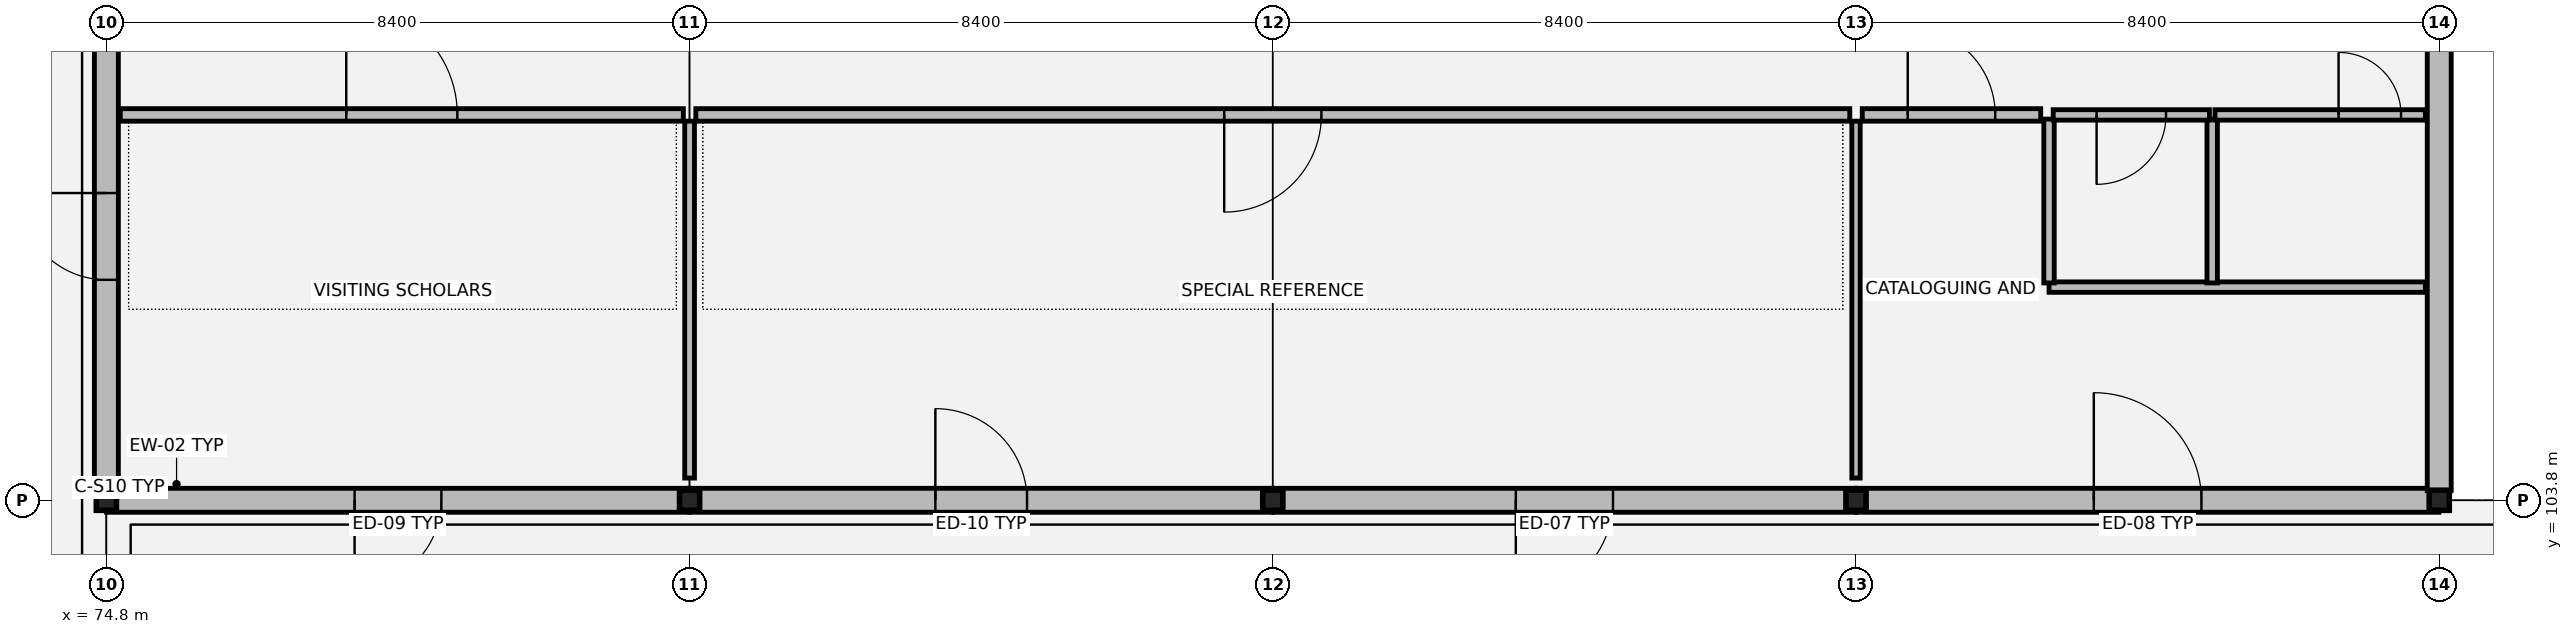
"""IFC4 building model, lengths in metres.
Left out: names, types, materials, properties, quantities, classifications, styles, units other than length and angle.
Written with IfcOpenShell. Run it as: python <this file> out.ifc"""

import sys

from ifc_helpers import new_model, si_unit, direction, frame, frame_2d, origin, origin_2d, place, context, subcontext, project, spatial, rectangle, i_section, extrude, element, fill, save


model = new_model("IFC4")
c1 = context("Model", 3, precision=1e-05, world=origin(), true_north=direction((0.0, 1.0)))
c2 = subcontext(c1, "Body", "Model", "MODEL_VIEW")
j1 = project(units=[si_unit("LENGTHUNIT", "METRE"), si_unit("PLANEANGLEUNIT", "RADIAN")], contexts=[c1])
p1 = place(None, origin())
s1 = spatial("IfcSite", under=j1, at=p1, CompositionType="ELEMENT")
p2 = place(p1, origin())
s2 = spatial("IfcBuilding", under=s1, at=p2, CompositionType="ELEMENT")
p3 = place(p2, frame((0.0, 0.0, 21.42)))
s3 = spatial("IfcBuildingStorey", under=s2, at=p3, CompositionType="ELEMENT", Elevation=21.42)
for number, where, z_axis, x_axis in (
    (1, (74.8, 103.8, 0.0), (0.0, 0.0, 1.0), (1.0, 0.0, 0.0)),
    (2, (83.2, 103.8, 0.0), (0.0, 0.0, 1.0), (1.0, 0.0, 0.0)),
    (3, (91.6, 103.8, 0.0), (0.0, 0.0, 1.0), (1.0, 0.0, 0.0)),
    (4, (100.0, 103.8, 0.0), (0.0, 0.0, 1.0), (1.0, 0.0, 0.0)),
    (5, (108.4, 103.8, 0.0), (0.0, 0.0, 1.0), (1.0, 0.0, 0.0)),
):
    element("IfcColumn", number, at=place(p3, frame(where, z_axis=z_axis, x_axis=x_axis)), inside=s3, PredefinedType="COLUMN", context=c2, shape_type="SweptSolid", body=[
        extrude(i_section(OverallWidth=0.28, OverallDepth=0.28, WebThickness=0.01, FlangeThickness=0.018, at=origin_2d()), origin(), (0.0, 0.0, 1.0), 3.88),
    ])
p4 = place(p3, frame((74.804, 103.8, 0.0), z_axis=(0.0, 0.0, 1.0), x_axis=(1.0, 0.0, 0.0)))
e6 = element("IfcWall", 6, at=p4, inside=s3, PredefinedType="SOLIDWALL", context=c2, shape_type="SweptSolid", body=[
    extrude(rectangle(XDim=8.392, YDim=0.345, at=frame_2d((4.196, 0.0))), origin(), (0.0, 0.0, 1.0), 3.32),
])
p5 = place(p4, frame((3.571, 0.0, 0.0)))
e7 = element("IfcOpeningElement", 7, at=p5, cuts=e6, PredefinedType="OPENING", context=c2, shape_type="SweptSolid", body=[
    extrude(rectangle(XDim=1.25, YDim=2.2, at=frame_2d((0.625, 1.1))), frame((0.0, 0.182, 0.0), z_axis=(0.0, -1.0, 0.0), x_axis=(1.0, 0.0, 0.0)), (0.0, 0.0, 1.0), 0.365),
])
p6 = place(p3, frame((83.204, 103.8, 0.0), z_axis=(0.0, 0.0, 1.0), x_axis=(1.0, 0.0, 0.0)))
e8 = element("IfcWall", 8, at=p6, inside=s3, PredefinedType="SOLIDWALL", context=c2, shape_type="SweptSolid", body=[
    extrude(rectangle(XDim=8.392, YDim=0.345, at=frame_2d((4.196, 0.0))), origin(), (0.0, 0.0, 1.0), 3.32),
])
p7 = place(p6, frame((3.536, 0.0, 0.0)))
e9 = element("IfcOpeningElement", 9, at=p7, cuts=e8, PredefinedType="OPENING", context=c2, shape_type="SweptSolid", body=[
    extrude(rectangle(XDim=1.32, YDim=2.22, at=frame_2d((0.66, 1.11))), frame((0.0, 0.182, 0.0), z_axis=(0.0, -1.0, 0.0), x_axis=(1.0, 0.0, 0.0)), (0.0, 0.0, 1.0), 0.365),
])
p8 = place(p3, frame((91.604, 103.8, 0.0), z_axis=(0.0, 0.0, 1.0), x_axis=(1.0, 0.0, 0.0)))
e10 = element("IfcWall", 10, at=p8, inside=s3, PredefinedType="SOLIDWALL", context=c2, shape_type="SweptSolid", body=[
    extrude(rectangle(XDim=8.392, YDim=0.345, at=frame_2d((4.196, 0.0))), origin(), (0.0, 0.0, 1.0), 3.32),
])
p9 = place(p8, frame((3.496, 0.0, 0.0)))
e11 = element("IfcOpeningElement", 11, at=p9, cuts=e10, PredefinedType="OPENING", context=c2, shape_type="SweptSolid", body=[
    extrude(rectangle(XDim=1.4, YDim=2.25, at=frame_2d((0.7, 1.125))), frame((0.0, 0.182, 0.0), z_axis=(0.0, -1.0, 0.0), x_axis=(1.0, 0.0, 0.0)), (0.0, 0.0, 1.0), 0.365),
])
p10 = place(p3, frame((100.004, 103.8, 0.0), z_axis=(0.0, 0.0, 1.0), x_axis=(1.0, 0.0, 0.0)))
e12 = element("IfcWall", 12, at=p10, inside=s3, PredefinedType="SOLIDWALL", context=c2, shape_type="SweptSolid", body=[
    extrude(rectangle(XDim=8.392, YDim=0.345, at=frame_2d((4.196, 0.0))), origin(), (0.0, 0.0, 1.0), 3.32),
])
p11 = place(p10, frame((3.421, 0.0, 0.0)))
e13 = element("IfcOpeningElement", 13, at=p11, cuts=e12, PredefinedType="OPENING", context=c2, shape_type="SweptSolid", body=[
    extrude(rectangle(XDim=1.55, YDim=2.28, at=frame_2d((0.775, 1.14))), frame((0.0, 0.182, 0.0), z_axis=(0.0, -1.0, 0.0), x_axis=(1.0, 0.0, 0.0)), (0.0, 0.0, 1.0), 0.365),
])
p12 = place(p3, frame((108.4, 103.938, 0.0), z_axis=(0.0, 0.0, 1.0), x_axis=(0.0, 1.0, 0.0)))
e14 = element("IfcWall", 14, at=p12, inside=s3, PredefinedType="SOLIDWALL", context=c2, shape_type="SweptSolid", body=[
    extrude(rectangle(XDim=7.324, YDim=0.345, at=frame_2d((3.662, 0.0))), origin(), (0.0, 0.0, 1.0), 3.22),
])
p13 = place(p3, frame((74.8, 111.262, 0.0), z_axis=(0.0, 0.0, 1.0), x_axis=(0.0, -1.0, 0.0)))
e15 = element("IfcWall", 15, at=p13, inside=s3, PredefinedType="SOLIDWALL", context=c2, shape_type="SweptSolid", body=[
    extrude(rectangle(XDim=7.324, YDim=0.345, at=frame_2d((3.662, 0.0))), origin(), (0.0, 0.0, 1.0), 3.22),
])
p14 = place(p13, frame((3.037, 0.0, 0.0)))
e16 = element("IfcOpeningElement", 16, at=p14, cuts=e15, PredefinedType="OPENING", context=c2, shape_type="SweptSolid", body=[
    extrude(rectangle(XDim=1.25, YDim=2.2, at=frame_2d((0.625, 1.1))), frame((0.0, 0.182, 0.0), z_axis=(0.0, -1.0, 0.0), x_axis=(1.0, 0.0, 0.0)), (0.0, 0.0, 1.0), 0.365),
])
p15 = place(p3, frame((102.78, 106.87, 0.0), z_axis=(0.0, 0.0, 1.0), x_axis=(1.0, 0.0, 0.0)))
e17 = element("IfcWall", 17, at=p15, inside=s3, PredefinedType="PARTITIONING", context=c2, shape_type="SweptSolid", body=[
    extrude(rectangle(XDim=5.42, YDim=0.15, at=frame_2d((2.71, 0.0))), origin(), (0.0, 0.0, 1.0), 3.18),
])
for number, where, z_axis, x_axis in (
    (18, (102.78, 106.93, 0.0), (0.0, 0.0, 1.0), (0.0, 1.0, 0.0)),
    (19, (105.13, 106.93, 0.0), (0.0, 0.0, 1.0), (0.0, 1.0, 0.0)),
):
    element("IfcWall", number, at=place(p3, frame(where, z_axis=z_axis, x_axis=x_axis)), inside=s3, PredefinedType="PARTITIONING", context=c2, shape_type="SweptSolid", body=[
        extrude(rectangle(XDim=2.36, YDim=0.15, at=frame_2d((1.18, 0.0))), origin(), (0.0, 0.0, 1.0), 3.18),
    ])
p16 = place(p3, frame((102.84, 109.35, 0.0), z_axis=(0.0, 0.0, 1.0), x_axis=(1.0, 0.0, 0.0)))
e20 = element("IfcWall", 20, at=p16, inside=s3, PredefinedType="PARTITIONING", context=c2, shape_type="SweptSolid", body=[
    extrude(rectangle(XDim=2.25, YDim=0.15, at=frame_2d((1.125, 0.0))), origin(), (0.0, 0.0, 1.0), 3.18),
])
p17 = place(p16, frame((0.625, 0.0, 0.0)))
e21 = element("IfcOpeningElement", 21, at=p17, cuts=e20, PredefinedType="OPENING", context=c2, shape_type="SweptSolid", body=[
    extrude(rectangle(XDim=1.0, YDim=2.15, at=frame_2d((0.5, 1.075))), frame((0.0, 0.085, 0.0), z_axis=(0.0, -1.0, 0.0), x_axis=(1.0, 0.0, 0.0)), (0.0, 0.0, 1.0), 0.17),
])
p18 = place(p3, frame((105.17, 109.35, 0.0), z_axis=(0.0, 0.0, 1.0), x_axis=(1.0, 0.0, 0.0)))
e22 = element("IfcWall", 22, at=p18, inside=s3, PredefinedType="PARTITIONING", context=c2, shape_type="SweptSolid", body=[
    extrude(rectangle(XDim=3.03, YDim=0.15, at=frame_2d((1.515, 0.0))), origin(), (0.0, 0.0, 1.0), 3.18),
])
p19 = place(p18, frame((1.78, 0.0, 0.0)))
e23 = element("IfcOpeningElement", 23, at=p19, cuts=e22, PredefinedType="OPENING", context=c2, shape_type="SweptSolid", body=[
    extrude(rectangle(XDim=0.9, YDim=2.15, at=frame_2d((0.45, 1.075))), frame((0.0, 0.085, 0.0), z_axis=(0.0, -1.0, 0.0), x_axis=(1.0, 0.0, 0.0)), (0.0, 0.0, 1.0), 0.17),
])
p20 = place(p3, frame((75.0, 109.35, 0.0), z_axis=(0.0, 0.0, 1.0), x_axis=(1.0, 0.0, 0.0)))
e24 = element("IfcWall", 24, at=p20, inside=s3, PredefinedType="PARTITIONING", context=c2, shape_type="SweptSolid", body=[
    extrude(rectangle(XDim=8.11, YDim=0.18, at=frame_2d((4.055, 0.0))), origin(), (0.0, 0.0, 1.0), 3.18),
])
p21 = place(p20, frame((3.255, 0.0, 0.0)))
e25 = element("IfcOpeningElement", 25, at=p21, cuts=e24, PredefinedType="OPENING", context=c2, shape_type="SweptSolid", body=[
    extrude(rectangle(XDim=1.6, YDim=2.25, at=frame_2d((0.8, 1.125))), frame((0.0, 0.1, 0.0), z_axis=(0.0, -1.0, 0.0), x_axis=(1.0, 0.0, 0.0)), (0.0, 0.0, 1.0), 0.2),
])
p22 = place(p3, frame((83.29, 109.35, 0.0), z_axis=(0.0, 0.0, 1.0), x_axis=(1.0, 0.0, 0.0)))
e26 = element("IfcWall", 26, at=p22, inside=s3, PredefinedType="PARTITIONING", context=c2, shape_type="SweptSolid", body=[
    extrude(rectangle(XDim=16.62, YDim=0.18, at=frame_2d((8.31, 0.0))), origin(), (0.0, 0.0, 1.0), 3.18),
])
p23 = place(p22, frame((7.61, 0.0, 0.0)))
e27 = element("IfcOpeningElement", 27, at=p23, cuts=e26, PredefinedType="OPENING", context=c2, shape_type="SweptSolid", body=[
    extrude(rectangle(XDim=1.4, YDim=2.22, at=frame_2d((0.7, 1.11))), frame((0.0, 0.1, 0.0), z_axis=(0.0, -1.0, 0.0), x_axis=(1.0, 0.0, 0.0)), (0.0, 0.0, 1.0), 0.2),
])
p24 = place(p3, frame((100.09, 109.35, 0.0), z_axis=(0.0, 0.0, 1.0), x_axis=(1.0, 0.0, 0.0)))
e28 = element("IfcWall", 28, at=p24, inside=s3, PredefinedType="PARTITIONING", context=c2, shape_type="SweptSolid", body=[
    extrude(rectangle(XDim=2.57, YDim=0.18, at=frame_2d((1.285, 0.0))), origin(), (0.0, 0.0, 1.0), 3.18),
])
p25 = place(p24, frame((0.655, 0.0, 0.0)))
e29 = element("IfcOpeningElement", 29, at=p25, cuts=e28, PredefinedType="OPENING", context=c2, shape_type="SweptSolid", body=[
    extrude(rectangle(XDim=1.26, YDim=2.2, at=frame_2d((0.63, 1.1))), frame((0.0, 0.1, 0.0), z_axis=(0.0, -1.0, 0.0), x_axis=(1.0, 0.0, 0.0)), (0.0, 0.0, 1.0), 0.2),
])
p26 = place(p3, frame((83.2, 104.12, 0.0), z_axis=(0.0, 0.0, 1.0), x_axis=(0.0, 1.0, 0.0)))
e30 = element("IfcWall", 30, at=p26, inside=s3, PredefinedType="PARTITIONING", context=c2, shape_type="SweptSolid", body=[
    extrude(rectangle(XDim=5.14, YDim=0.14, at=frame_2d((2.57, 0.0))), origin(), (0.0, 0.0, 1.0), 3.18),
])
p27 = place(p3, frame((100.0, 104.12, 0.0), z_axis=(0.0, 0.0, 1.0), x_axis=(0.0, 1.0, 0.0)))
e31 = element("IfcWall", 31, at=p27, inside=s3, PredefinedType="PARTITIONING", context=c2, shape_type="SweptSolid", body=[
    extrude(rectangle(XDim=5.14, YDim=0.12, at=frame_2d((2.57, 0.0))), origin(), (0.0, 0.0, 1.0), 3.18),
])
p28 = place(p5, origin())
e32 = element("IfcDoor", 32, at=p28, inside=s3, OperationType="SINGLE_SWING_RIGHT", PredefinedType="DOOR", context=c2, shape_type="SweptSolid", body=[
    extrude(rectangle(XDim=1.25, YDim=2.2, at=frame_2d((0.625, 1.1))), frame((0.0, 0.025, 0.0), z_axis=(0.0, -1.0, 0.0), x_axis=(1.0, 0.0, 0.0)), (0.0, 0.0, 1.0), 0.05),
])
fill(e7, e32)
p29 = place(p7, origin())
e33 = element("IfcDoor", 33, at=p29, inside=s3, OperationType="SINGLE_SWING_LEFT", PredefinedType="DOOR", context=c2, shape_type="SweptSolid", body=[
    extrude(rectangle(XDim=1.32, YDim=2.22, at=frame_2d((0.66, 1.11))), frame((0.0, 0.025, 0.0), z_axis=(0.0, -1.0, 0.0), x_axis=(1.0, 0.0, 0.0)), (0.0, 0.0, 1.0), 0.05),
])
fill(e9, e33)
p30 = place(p9, origin())
e34 = element("IfcDoor", 34, at=p30, inside=s3, OperationType="SINGLE_SWING_RIGHT", PredefinedType="DOOR", context=c2, shape_type="SweptSolid", body=[
    extrude(rectangle(XDim=1.4, YDim=2.25, at=frame_2d((0.7, 1.125))), frame((0.0, 0.025, 0.0), z_axis=(0.0, -1.0, 0.0), x_axis=(1.0, 0.0, 0.0)), (0.0, 0.0, 1.0), 0.05),
])
fill(e11, e34)
p31 = place(p11, origin())
e35 = element("IfcDoor", 35, at=p31, inside=s3, OperationType="SINGLE_SWING_LEFT", PredefinedType="DOOR", context=c2, shape_type="SweptSolid", body=[
    extrude(rectangle(XDim=1.55, YDim=2.28, at=frame_2d((0.775, 1.14))), frame((0.0, 0.025, 0.0), z_axis=(0.0, -1.0, 0.0), x_axis=(1.0, 0.0, 0.0)), (0.0, 0.0, 1.0), 0.05),
])
fill(e13, e35)
p32 = place(p14, origin())
e36 = element("IfcDoor", 36, at=p32, inside=s3, OperationType="SINGLE_SWING_RIGHT", PredefinedType="DOOR", context=c2, shape_type="SweptSolid", body=[
    extrude(rectangle(XDim=1.25, YDim=2.2, at=frame_2d((0.625, 1.1))), frame((0.0, 0.025, 0.0), z_axis=(0.0, -1.0, 0.0), x_axis=(1.0, 0.0, 0.0)), (0.0, 0.0, 1.0), 0.05),
])
fill(e16, e36)
p33 = place(p17, origin())
e37 = element("IfcDoor", 37, at=p33, inside=s3, OperationType="SINGLE_SWING_RIGHT", PredefinedType="DOOR", context=c2, shape_type="SweptSolid", body=[
    extrude(rectangle(XDim=1.0, YDim=2.15, at=frame_2d((0.5, 1.075))), frame((0.0, 0.025, 0.0), z_axis=(0.0, -1.0, 0.0), x_axis=(1.0, 0.0, 0.0)), (0.0, 0.0, 1.0), 0.05),
])
fill(e21, e37)
p34 = place(p19, origin())
e38 = element("IfcDoor", 38, at=p34, inside=s3, OperationType="SINGLE_SWING_LEFT", PredefinedType="DOOR", context=c2, shape_type="SweptSolid", body=[
    extrude(rectangle(XDim=0.9, YDim=2.15, at=frame_2d((0.45, 1.075))), frame((0.0, 0.025, 0.0), z_axis=(0.0, -1.0, 0.0), x_axis=(1.0, 0.0, 0.0)), (0.0, 0.0, 1.0), 0.05),
])
fill(e23, e38)
p35 = place(p21, origin())
e39 = element("IfcDoor", 39, at=p35, inside=s3, OperationType="DOUBLE_DOOR_SINGLE_SWING", PredefinedType="DOOR", context=c2, shape_type="SweptSolid", body=[
    extrude(rectangle(XDim=1.6, YDim=2.25, at=frame_2d((0.8, 1.125))), frame((0.0, 0.025, 0.0), z_axis=(0.0, -1.0, 0.0), x_axis=(1.0, 0.0, 0.0)), (0.0, 0.0, 1.0), 0.05),
])
fill(e25, e39)
p36 = place(p23, origin())
e40 = element("IfcDoor", 40, at=p36, inside=s3, OperationType="SINGLE_SWING_RIGHT", PredefinedType="DOOR", context=c2, shape_type="SweptSolid", body=[
    extrude(rectangle(XDim=1.4, YDim=2.22, at=frame_2d((0.7, 1.11))), frame((0.0, 0.025, 0.0), z_axis=(0.0, -1.0, 0.0), x_axis=(1.0, 0.0, 0.0)), (0.0, 0.0, 1.0), 0.05),
])
fill(e27, e40)
p37 = place(p25, origin())
e41 = element("IfcDoor", 41, at=p37, inside=s3, OperationType="SINGLE_SWING_LEFT", PredefinedType="DOOR", context=c2, shape_type="SweptSolid", body=[
    extrude(rectangle(XDim=1.26, YDim=2.2, at=frame_2d((0.63, 1.1))), frame((0.0, 0.025, 0.0), z_axis=(0.0, -1.0, 0.0), x_axis=(1.0, 0.0, 0.0)), (0.0, 0.0, 1.0), 0.05),
])
fill(e29, e41)
save(model, sys.argv[1])
